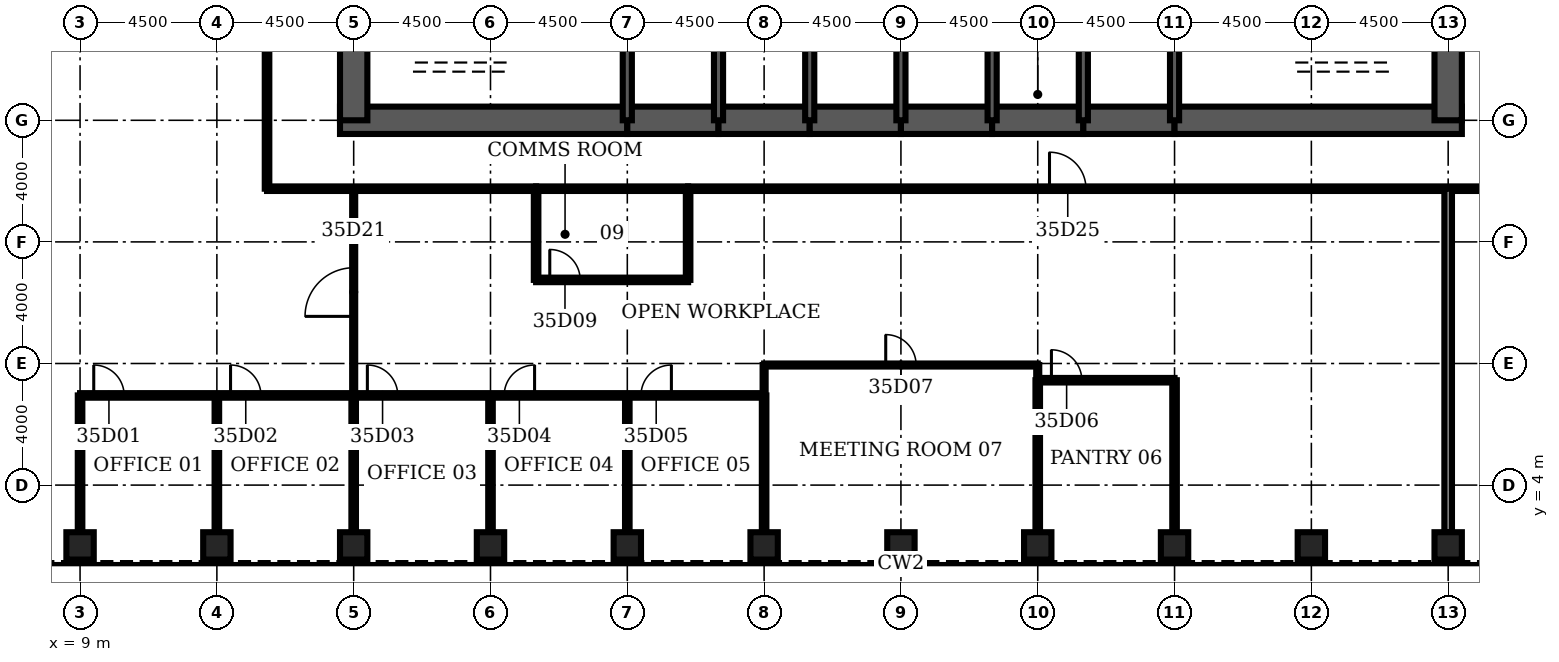
"""IFC4 building model, lengths in metres.
Left out: names, types, materials, properties, quantities, classifications, styles, units other than length and angle.
Written with IfcOpenShell. Run it as: python <this file> out.ifc"""

import sys

from ifc_helpers import new_model, si_unit, direction, frame, frame_2d, origin, origin_2d, place, context, subcontext, project, spatial, rectangle, hollow_rectangle, extrude, element, fill, save


model = new_model("IFC4")
c1 = context("Model", 3, precision=1e-05, world=origin(), true_north=direction((0.0, 1.0)))
c2 = subcontext(c1, "Body", "Model", "MODEL_VIEW")
j1 = project(units=[si_unit("LENGTHUNIT", "METRE"), si_unit("PLANEANGLEUNIT", "RADIAN")], contexts=[c1])
p1 = place(None, origin())
s1 = spatial("IfcSite", under=j1, at=p1, CompositionType="ELEMENT")
p2 = place(p1, origin())
s2 = spatial("IfcBuilding", under=s1, at=p2, CompositionType="ELEMENT")
p3 = place(p2, frame((0.0, 0.0, 159.3)))
s3 = spatial("IfcBuildingStorey", under=s2, at=p3, CompositionType="ELEMENT", Elevation=159.3)
for number, where, z_axis, x_axis in (
    (1, (9.0, 2.0, 0.0), (0.0, 0.0, 1.0), (0.0, 1.0, 0.0)),
    (2, (13.5, 2.0, 0.0), (0.0, 0.0, 1.0), (0.0, 1.0, 0.0)),
    (3, (18.0, 2.0, 0.0), (0.0, 0.0, 1.0), (0.0, 1.0, 0.0)),
    (4, (22.5, 2.0, 0.0), (0.0, 0.0, 1.0), (0.0, 1.0, 0.0)),
    (5, (27.0, 2.0, 0.0), (0.0, 0.0, 1.0), (0.0, 1.0, 0.0)),
    (6, (31.5, 2.0, 0.0), (0.0, 0.0, 1.0), (0.0, 1.0, 0.0)),
    (7, (36.0, 2.0, 0.0), (0.0, 0.0, 1.0), (0.0, 1.0, 0.0)),
    (8, (40.5, 2.0, 0.0), (0.0, 0.0, 1.0), (0.0, 1.0, 0.0)),
    (9, (45.0, 2.0, 0.0), (0.0, 0.0, 1.0), (0.0, 1.0, 0.0)),
    (10, (49.5, 2.0, 0.0), (0.0, 0.0, 1.0), (0.0, 1.0, 0.0)),
    (11, (54.0, 2.0, 0.0), (0.0, 0.0, 1.0), (0.0, 1.0, 0.0)),
):
    element("IfcColumn", number, at=place(p3, frame(where, z_axis=z_axis, x_axis=x_axis)), inside=s3, PredefinedType="COLUMN", context=c2, shape_type="SweptSolid", body=[
        extrude(hollow_rectangle(XDim=0.9, YDim=0.9, WallThickness=0.1, at=origin_2d()), origin(), (0.0, 0.0, 1.0), 4.2),
    ])
p4 = place(p3, frame((17.55, 16.0, 0.0), z_axis=(0.0, 0.0, 1.0), x_axis=(1.0, 0.0, 0.0)))
e12 = element("IfcWall", 12, at=p4, inside=s3, PredefinedType="SHEAR", context=c2, shape_type="SweptSolid", body=[
    extrude(rectangle(XDim=9.45, YDim=0.9, at=frame_2d((4.725, 0.0))), origin(), (0.0, 0.0, 1.0), 4.2),
])
for number, where, z_axis, x_axis in (
    (13, (27.0, 16.0, 0.0), (0.0, 0.0, 1.0), (1.0, 0.0, 0.0)),
    (14, (30.0, 16.0, 0.0), (0.0, 0.0, 1.0), (1.0, 0.0, 0.0)),
    (15, (33.0, 16.0, 0.0), (0.0, 0.0, 1.0), (1.0, 0.0, 0.0)),
    (16, (36.0, 16.0, 0.0), (0.0, 0.0, 1.0), (1.0, 0.0, 0.0)),
    (17, (39.0, 16.0, 0.0), (0.0, 0.0, 1.0), (1.0, 0.0, 0.0)),
    (18, (42.0, 16.0, 0.0), (0.0, 0.0, 1.0), (1.0, 0.0, 0.0)),
):
    element("IfcWall", number, at=place(p3, frame(where, z_axis=z_axis, x_axis=x_axis)), inside=s3, PredefinedType="SHEAR", context=c2, shape_type="SweptSolid", body=[
        extrude(rectangle(XDim=3.0, YDim=0.9, at=frame_2d((1.5, 0.0))), origin(), (0.0, 0.0, 1.0), 4.2),
    ])
p5 = place(p3, frame((45.0, 16.0, 0.0), z_axis=(0.0, 0.0, 1.0), x_axis=(1.0, 0.0, 0.0)))
e19 = element("IfcWall", 19, at=p5, inside=s3, PredefinedType="SHEAR", context=c2, shape_type="SweptSolid", body=[
    extrude(rectangle(XDim=9.45, YDim=0.9, at=frame_2d((4.725, 0.0))), origin(), (0.0, 0.0, 1.0), 4.2),
])
for number, where, z_axis, x_axis in (
    (20, (18.0, 19.2, 0.0), (0.0, 0.0, 1.0), (0.0, -1.0, 0.0)),
    (21, (54.0, 16.0, 0.0), (0.0, 0.0, 1.0), (0.0, 1.0, 0.0)),
):
    element("IfcWall", number, at=place(p3, frame(where, z_axis=z_axis, x_axis=x_axis)), inside=s3, PredefinedType="SHEAR", context=c2, shape_type="SweptSolid", body=[
        extrude(rectangle(XDim=3.2, YDim=0.9, at=frame_2d((1.6, 0.0))), origin(), (0.0, 0.0, 1.0), 4.2),
    ])
for number, where, z_axis, x_axis in (
    (22, (27.0, 16.0, 0.0), (0.0, 0.0, 1.0), (0.0, 1.0, 0.0)),
    (23, (30.0, 16.0, 0.0), (0.0, 0.0, 1.0), (0.0, 1.0, 0.0)),
    (24, (33.0, 16.0, 0.0), (0.0, 0.0, 1.0), (0.0, 1.0, 0.0)),
    (25, (36.0, 16.0, 0.0), (0.0, 0.0, 1.0), (0.0, 1.0, 0.0)),
    (26, (39.0, 16.0, 0.0), (0.0, 0.0, 1.0), (0.0, 1.0, 0.0)),
    (27, (42.0, 16.0, 0.0), (0.0, 0.0, 1.0), (0.0, 1.0, 0.0)),
    (28, (45.0, 16.0, 0.0), (0.0, 0.0, 1.0), (0.0, 1.0, 0.0)),
):
    element("IfcWall", number, at=place(p3, frame(where, z_axis=z_axis, x_axis=x_axis)), inside=s3, PredefinedType="SOLIDWALL", context=c2, shape_type="SweptSolid", body=[
        extrude(rectangle(XDim=3.2, YDim=0.3, at=frame_2d((1.6, 0.0))), origin(), (0.0, 0.0, 1.0), 4.2),
    ])
p6 = place(p3, frame((39.15, 17.4, 0.0), z_axis=(0.0, 0.0, 1.0), x_axis=(1.0, 0.0, 0.0)))
e29 = element("IfcWall", 29, at=p6, inside=s3, PredefinedType="SOLIDWALL", context=c2, shape_type="SweptSolid", body=[
    extrude(rectangle(XDim=2.7, YDim=0.3, at=frame_2d((1.35, 0.0))), origin(), (0.0, 0.0, 1.0), 4.04),
])
p7 = place(p6, frame((0.85, 0.0, 0.0)))
e30 = element("IfcOpeningElement", 30, at=p7, cuts=e29, PredefinedType="OPENING", context=c2, shape_type="SweptSolid", body=[
    extrude(rectangle(XDim=1.0, YDim=2.1, at=frame_2d((0.5, 1.05))), frame((0.0, 0.16, 0.0), z_axis=(0.0, -1.0, 0.0), x_axis=(1.0, 0.0, 0.0)), (0.0, 0.0, 1.0), 0.32),
])
p8 = place(p3, frame((9.0, 6.95, 0.0), z_axis=(0.0, 0.0, 1.0), x_axis=(1.0, 0.0, 0.0)))
e31 = element("IfcWall", 31, at=p8, inside=s3, PredefinedType="PARTITIONING", context=c2, shape_type="SweptSolid", body=[
    extrude(rectangle(XDim=22.5, YDim=0.15, at=frame_2d((11.25, 0.0))), origin(), (0.0, 0.0, 1.0), 3.0),
])
p9 = place(p8, frame((0.45, 0.0, 0.0)))
e32 = element("IfcOpeningElement", 32, at=p9, cuts=e31, PredefinedType="OPENING", context=c2, shape_type="SweptSolid", body=[
    extrude(rectangle(XDim=1.0, YDim=2.1, at=frame_2d((0.5, 1.05))), frame((0.0, 0.085, 0.0), z_axis=(0.0, -1.0, 0.0), x_axis=(1.0, 0.0, 0.0)), (0.0, 0.0, 1.0), 0.17),
])
p10 = place(p8, frame((4.95, 0.0, 0.0)))
e33 = element("IfcOpeningElement", 33, at=p10, cuts=e31, PredefinedType="OPENING", context=c2, shape_type="SweptSolid", body=[
    extrude(rectangle(XDim=1.0, YDim=2.1, at=frame_2d((0.5, 1.05))), frame((0.0, 0.085, 0.0), z_axis=(0.0, -1.0, 0.0), x_axis=(1.0, 0.0, 0.0)), (0.0, 0.0, 1.0), 0.17),
])
p11 = place(p8, frame((9.45, 0.0, 0.0)))
e34 = element("IfcOpeningElement", 34, at=p11, cuts=e31, PredefinedType="OPENING", context=c2, shape_type="SweptSolid", body=[
    extrude(rectangle(XDim=1.0, YDim=2.1, at=frame_2d((0.5, 1.05))), frame((0.0, 0.085, 0.0), z_axis=(0.0, -1.0, 0.0), x_axis=(1.0, 0.0, 0.0)), (0.0, 0.0, 1.0), 0.17),
])
p12 = place(p8, frame((13.95, 0.0, 0.0)))
e35 = element("IfcOpeningElement", 35, at=p12, cuts=e31, PredefinedType="OPENING", context=c2, shape_type="SweptSolid", body=[
    extrude(rectangle(XDim=1.0, YDim=2.1, at=frame_2d((0.5, 1.05))), frame((0.0, 0.085, 0.0), z_axis=(0.0, -1.0, 0.0), x_axis=(1.0, 0.0, 0.0)), (0.0, 0.0, 1.0), 0.17),
])
p13 = place(p8, frame((18.45, 0.0, 0.0)))
e36 = element("IfcOpeningElement", 36, at=p13, cuts=e31, PredefinedType="OPENING", context=c2, shape_type="SweptSolid", body=[
    extrude(rectangle(XDim=1.0, YDim=2.1, at=frame_2d((0.5, 1.05))), frame((0.0, 0.085, 0.0), z_axis=(0.0, -1.0, 0.0), x_axis=(1.0, 0.0, 0.0)), (0.0, 0.0, 1.0), 0.17),
])
p14 = place(p3, frame((40.5, 7.45, 0.0), z_axis=(0.0, 0.0, 1.0), x_axis=(1.0, 0.0, 0.0)))
e37 = element("IfcWall", 37, at=p14, inside=s3, PredefinedType="PARTITIONING", context=c2, shape_type="SweptSolid", body=[
    extrude(rectangle(XDim=4.5, YDim=0.15, at=frame_2d((2.25, 0.0))), origin(), (0.0, 0.0, 1.0), 3.0),
])
p15 = place(p14, frame((0.45, 0.0, 0.0)))
e38 = element("IfcOpeningElement", 38, at=p15, cuts=e37, PredefinedType="OPENING", context=c2, shape_type="SweptSolid", body=[
    extrude(rectangle(XDim=1.0, YDim=2.1, at=frame_2d((0.5, 1.05))), frame((0.0, 0.085, 0.0), z_axis=(0.0, -1.0, 0.0), x_axis=(1.0, 0.0, 0.0)), (0.0, 0.0, 1.0), 0.17),
])
p16 = place(p3, frame((31.5, 7.95, 0.0), z_axis=(0.0, 0.0, 1.0), x_axis=(1.0, 0.0, 0.0)))
e39 = element("IfcWall", 39, at=p16, inside=s3, PredefinedType="PARTITIONING", context=c2, shape_type="SweptSolid", body=[
    extrude(rectangle(XDim=9.0, YDim=0.1, at=frame_2d((4.5, 0.0))), origin(), (0.0, 0.0, 1.0), 3.0),
])
p17 = place(p16, frame((4.0, 0.0, 0.0)))
e40 = element("IfcOpeningElement", 40, at=p17, cuts=e39, PredefinedType="OPENING", context=c2, shape_type="SweptSolid", body=[
    extrude(rectangle(XDim=1.0, YDim=2.1, at=frame_2d((0.5, 1.05))), frame((0.0, 0.06, 0.0), z_axis=(0.0, -1.0, 0.0), x_axis=(1.0, 0.0, 0.0)), (0.0, 0.0, 1.0), 0.12),
])
p18 = place(p3, frame((24.0, 10.75, 0.0), z_axis=(0.0, 0.0, 1.0), x_axis=(1.0, 0.0, 0.0)))
e41 = element("IfcWall", 41, at=p18, inside=s3, PredefinedType="PARTITIONING", context=c2, shape_type="SweptSolid", body=[
    extrude(rectangle(XDim=5.0, YDim=0.15, at=frame_2d((2.5, 0.0))), origin(), (0.0, 0.0, 1.0), 3.0),
])
p19 = place(p18, frame((0.45, 0.0, 0.0)))
e42 = element("IfcOpeningElement", 42, at=p19, cuts=e41, PredefinedType="OPENING", context=c2, shape_type="SweptSolid", body=[
    extrude(rectangle(XDim=1.0, YDim=2.1, at=frame_2d((0.5, 1.05))), frame((0.0, 0.085, 0.0), z_axis=(0.0, -1.0, 0.0), x_axis=(1.0, 0.0, 0.0)), (0.0, 0.0, 1.0), 0.17),
])
p20 = place(p3, frame((15.15, 13.75, 0.0), z_axis=(0.0, 0.0, 1.0), x_axis=(1.0, 0.0, 0.0)))
e43 = element("IfcWall", 43, at=p20, inside=s3, PredefinedType="PARTITIONING", context=c2, shape_type="SweptSolid", body=[
    extrude(rectangle(XDim=8.85, YDim=0.15, at=frame_2d((4.425, 0.0))), origin(), (0.0, 0.0, 1.0), 3.0),
])
p21 = place(p3, frame((24.0, 13.75, 0.0), z_axis=(0.0, 0.0, 1.0), x_axis=(1.0, 0.0, 0.0)))
e44 = element("IfcWall", 44, at=p21, inside=s3, PredefinedType="PARTITIONING", context=c2, shape_type="SweptSolid", body=[
    extrude(rectangle(XDim=5.0, YDim=0.15, at=frame_2d((2.5, 0.0))), origin(), (0.0, 0.0, 1.0), 3.0),
])
p22 = place(p3, frame((29.0, 13.75, 0.0), z_axis=(0.0, 0.0, 1.0), x_axis=(1.0, 0.0, 0.0)))
e45 = element("IfcWall", 45, at=p22, inside=s3, PredefinedType="PARTITIONING", context=c2, shape_type="SweptSolid", body=[
    extrude(rectangle(XDim=27.85, YDim=0.15, at=frame_2d((13.925, 0.0))), origin(), (0.0, 0.0, 1.0), 3.0),
])
p23 = place(p22, frame((11.887, 0.0, 0.0)))
e46 = element("IfcOpeningElement", 46, at=p23, cuts=e45, PredefinedType="OPENING", context=c2, shape_type="SweptSolid", body=[
    extrude(rectangle(XDim=1.2, YDim=2.1, at=frame_2d((0.6, 1.05))), frame((0.0, 0.085, 0.0), z_axis=(0.0, -1.0, 0.0), x_axis=(1.0, 0.0, 0.0)), (0.0, 0.0, 1.0), 0.17),
])
for number, where, z_axis, x_axis in (
    (47, (9.0, 2.45, 0.0), (0.0, 0.0, 1.0), (0.0, 1.0, 0.0)),
    (48, (13.5, 2.45, 0.0), (0.0, 0.0, 1.0), (0.0, 1.0, 0.0)),
):
    element("IfcWall", number, at=place(p3, frame(where, z_axis=z_axis, x_axis=x_axis)), inside=s3, PredefinedType="PARTITIONING", context=c2, shape_type="SweptSolid", body=[
        extrude(rectangle(XDim=4.5, YDim=0.15, at=frame_2d((2.25, 0.0))), origin(), (0.0, 0.0, 1.0), 3.0),
    ])
p24 = place(p3, frame((15.15, 13.75, 0.0), z_axis=(0.0, 0.0, 1.0), x_axis=(0.0, 1.0, 0.0)))
e49 = element("IfcWall", 49, at=p24, inside=s3, PredefinedType="PARTITIONING", context=c2, shape_type="SweptSolid", body=[
    extrude(rectangle(XDim=20.5, YDim=0.15, at=frame_2d((10.25, 0.0))), origin(), (0.0, 0.0, 1.0), 3.0),
])
p25 = place(p24, frame((9.65, 0.0, 0.0)))
e50 = element("IfcOpeningElement", 50, at=p25, cuts=e49, PredefinedType="OPENING", context=c2, shape_type="SweptSolid", body=[
    extrude(rectangle(XDim=1.2, YDim=2.1, at=frame_2d((0.6, 1.05))), frame((0.0, 0.085, 0.0), z_axis=(0.0, -1.0, 0.0), x_axis=(1.0, 0.0, 0.0)), (0.0, 0.0, 1.0), 0.17),
])
p26 = place(p3, frame((18.0, 2.45, 0.0), z_axis=(0.0, 0.0, 1.0), x_axis=(0.0, 1.0, 0.0)))
e51 = element("IfcWall", 51, at=p26, inside=s3, PredefinedType="PARTITIONING", context=c2, shape_type="SweptSolid", body=[
    extrude(rectangle(XDim=4.5, YDim=0.15, at=frame_2d((2.25, 0.0))), origin(), (0.0, 0.0, 1.0), 3.0),
])
p27 = place(p3, frame((18.0, 6.95, 0.0), z_axis=(0.0, 0.0, 1.0), x_axis=(0.0, 1.0, 0.0)))
e52 = element("IfcWall", 52, at=p27, inside=s3, PredefinedType="PARTITIONING", context=c2, shape_type="SweptSolid", body=[
    extrude(rectangle(XDim=6.8, YDim=0.1, at=frame_2d((3.4, 0.0))), origin(), (0.0, 0.0, 1.0), 3.0),
])
p28 = place(p27, frame((2.6, 0.0, 0.0)))
e53 = element("IfcOpeningElement", 53, at=p28, cuts=e52, PredefinedType="OPENING", context=c2, shape_type="SweptSolid", body=[
    extrude(rectangle(XDim=1.6, YDim=2.1, at=frame_2d((0.8, 1.05))), frame((0.0, 0.06, 0.0), z_axis=(0.0, -1.0, 0.0), x_axis=(1.0, 0.0, 0.0)), (0.0, 0.0, 1.0), 0.12),
])
p29 = place(p3, frame((22.5, 2.45, 0.0), z_axis=(0.0, 0.0, 1.0), x_axis=(0.0, 1.0, 0.0)))
e54 = element("IfcWall", 54, at=p29, inside=s3, PredefinedType="PARTITIONING", context=c2, shape_type="SweptSolid", body=[
    extrude(rectangle(XDim=4.5, YDim=0.15, at=frame_2d((2.25, 0.0))), origin(), (0.0, 0.0, 1.0), 3.0),
])
p30 = place(p3, frame((24.0, 10.75, 0.0), z_axis=(0.0, 0.0, 1.0), x_axis=(0.0, 1.0, 0.0)))
e55 = element("IfcWall", 55, at=p30, inside=s3, PredefinedType="PARTITIONING", context=c2, shape_type="SweptSolid", body=[
    extrude(rectangle(XDim=3.0, YDim=0.15, at=frame_2d((1.5, 0.0))), origin(), (0.0, 0.0, 1.0), 3.0),
])
p31 = place(p3, frame((27.0, 2.45, 0.0), z_axis=(0.0, 0.0, 1.0), x_axis=(0.0, 1.0, 0.0)))
e56 = element("IfcWall", 56, at=p31, inside=s3, PredefinedType="PARTITIONING", context=c2, shape_type="SweptSolid", body=[
    extrude(rectangle(XDim=4.5, YDim=0.15, at=frame_2d((2.25, 0.0))), origin(), (0.0, 0.0, 1.0), 3.0),
])
p32 = place(p3, frame((29.0, 10.75, 0.0), z_axis=(0.0, 0.0, 1.0), x_axis=(0.0, 1.0, 0.0)))
e57 = element("IfcWall", 57, at=p32, inside=s3, PredefinedType="PARTITIONING", context=c2, shape_type="SweptSolid", body=[
    extrude(rectangle(XDim=3.0, YDim=0.15, at=frame_2d((1.5, 0.0))), origin(), (0.0, 0.0, 1.0), 3.0),
])
p33 = place(p3, frame((31.5, 2.45, 0.0), z_axis=(0.0, 0.0, 1.0), x_axis=(0.0, 1.0, 0.0)))
e58 = element("IfcWall", 58, at=p33, inside=s3, PredefinedType="PARTITIONING", context=c2, shape_type="SweptSolid", body=[
    extrude(rectangle(XDim=4.5, YDim=0.15, at=frame_2d((2.25, 0.0))), origin(), (0.0, 0.0, 1.0), 3.0),
])
p34 = place(p3, frame((31.5, 6.95, 0.0), z_axis=(0.0, 0.0, 1.0), x_axis=(0.0, 1.0, 0.0)))
e59 = element("IfcWall", 59, at=p34, inside=s3, PredefinedType="PARTITIONING", context=c2, shape_type="SweptSolid", body=[
    extrude(rectangle(XDim=1.0, YDim=0.1, at=frame_2d((0.5, 0.0))), origin(), (0.0, 0.0, 1.0), 3.0),
])
p35 = place(p3, frame((40.5, 2.45, 0.0), z_axis=(0.0, 0.0, 1.0), x_axis=(0.0, 1.0, 0.0)))
e60 = element("IfcWall", 60, at=p35, inside=s3, PredefinedType="PARTITIONING", context=c2, shape_type="SweptSolid", body=[
    extrude(rectangle(XDim=5.0, YDim=0.15, at=frame_2d((2.5, 0.0))), origin(), (0.0, 0.0, 1.0), 3.0),
])
p36 = place(p3, frame((40.5, 7.45, 0.0), z_axis=(0.0, 0.0, 1.0), x_axis=(0.0, 1.0, 0.0)))
e61 = element("IfcWall", 61, at=p36, inside=s3, PredefinedType="PARTITIONING", context=c2, shape_type="SweptSolid", body=[
    extrude(rectangle(XDim=0.5, YDim=0.1, at=frame_2d((0.25, 0.0))), origin(), (0.0, 0.0, 1.0), 3.0),
])
p37 = place(p3, frame((45.0, 2.45, 0.0), z_axis=(0.0, 0.0, 1.0), x_axis=(0.0, 1.0, 0.0)))
e62 = element("IfcWall", 62, at=p37, inside=s3, PredefinedType="PARTITIONING", context=c2, shape_type="SweptSolid", body=[
    extrude(rectangle(XDim=5.0, YDim=0.15, at=frame_2d((2.5, 0.0))), origin(), (0.0, 0.0, 1.0), 3.0),
])
p38 = place(p3, frame((54.0, 2.45, 0.0), z_axis=(0.0, 0.0, 1.0), x_axis=(0.0, 1.0, 0.0)))
e63 = element("IfcWall", 63, at=p38, inside=s3, PredefinedType="PARTITIONING", context=c2, shape_type="SweptSolid", body=[
    extrude(rectangle(XDim=11.3, YDim=0.25, at=frame_2d((5.65, 0.0))), origin(), (0.0, 0.0, 1.0), 3.0),
])
p39 = place(p7, origin())
e64 = element("IfcDoor", 64, at=p39, inside=s3, OperationType="SINGLE_SWING_LEFT", PredefinedType="DOOR", context=c2, shape_type="SweptSolid", body=[
    extrude(rectangle(XDim=1.0, YDim=2.1, at=frame_2d((0.5, 1.05))), frame((0.0, 0.025, 0.0), z_axis=(0.0, -1.0, 0.0), x_axis=(1.0, 0.0, 0.0)), (0.0, 0.0, 1.0), 0.05),
])
fill(e30, e64)
p40 = place(p9, origin())
e65 = element("IfcDoor", 65, at=p40, inside=s3, OperationType="SINGLE_SWING_LEFT", PredefinedType="DOOR", context=c2, shape_type="SweptSolid", body=[
    extrude(rectangle(XDim=1.0, YDim=2.1, at=frame_2d((0.5, 1.05))), frame((0.0, 0.025, 0.0), z_axis=(0.0, -1.0, 0.0), x_axis=(1.0, 0.0, 0.0)), (0.0, 0.0, 1.0), 0.05),
])
fill(e32, e65)
p41 = place(p10, origin())
e66 = element("IfcDoor", 66, at=p41, inside=s3, OperationType="SINGLE_SWING_LEFT", PredefinedType="DOOR", context=c2, shape_type="SweptSolid", body=[
    extrude(rectangle(XDim=1.0, YDim=2.1, at=frame_2d((0.5, 1.05))), frame((0.0, 0.025, 0.0), z_axis=(0.0, -1.0, 0.0), x_axis=(1.0, 0.0, 0.0)), (0.0, 0.0, 1.0), 0.05),
])
fill(e33, e66)
p42 = place(p11, origin())
e67 = element("IfcDoor", 67, at=p42, inside=s3, OperationType="SINGLE_SWING_LEFT", PredefinedType="DOOR", context=c2, shape_type="SweptSolid", body=[
    extrude(rectangle(XDim=1.0, YDim=2.1, at=frame_2d((0.5, 1.05))), frame((0.0, 0.025, 0.0), z_axis=(0.0, -1.0, 0.0), x_axis=(1.0, 0.0, 0.0)), (0.0, 0.0, 1.0), 0.05),
])
fill(e34, e67)
p43 = place(p12, origin())
e68 = element("IfcDoor", 68, at=p43, inside=s3, OperationType="SINGLE_SWING_RIGHT", PredefinedType="DOOR", context=c2, shape_type="SweptSolid", body=[
    extrude(rectangle(XDim=1.0, YDim=2.1, at=frame_2d((0.5, 1.05))), frame((0.0, 0.025, 0.0), z_axis=(0.0, -1.0, 0.0), x_axis=(1.0, 0.0, 0.0)), (0.0, 0.0, 1.0), 0.05),
])
fill(e35, e68)
p44 = place(p13, origin())
e69 = element("IfcDoor", 69, at=p44, inside=s3, OperationType="SINGLE_SWING_RIGHT", PredefinedType="DOOR", context=c2, shape_type="SweptSolid", body=[
    extrude(rectangle(XDim=1.0, YDim=2.1, at=frame_2d((0.5, 1.05))), frame((0.0, 0.025, 0.0), z_axis=(0.0, -1.0, 0.0), x_axis=(1.0, 0.0, 0.0)), (0.0, 0.0, 1.0), 0.05),
])
fill(e36, e69)
p45 = place(p15, origin())
e70 = element("IfcDoor", 70, at=p45, inside=s3, OperationType="SINGLE_SWING_LEFT", PredefinedType="DOOR", context=c2, shape_type="SweptSolid", body=[
    extrude(rectangle(XDim=1.0, YDim=2.1, at=frame_2d((0.5, 1.05))), frame((0.0, 0.025, 0.0), z_axis=(0.0, -1.0, 0.0), x_axis=(1.0, 0.0, 0.0)), (0.0, 0.0, 1.0), 0.05),
])
fill(e38, e70)
p46 = place(p17, origin())
e71 = element("IfcDoor", 71, at=p46, inside=s3, OperationType="SINGLE_SWING_LEFT", PredefinedType="DOOR", context=c2, shape_type="SweptSolid", body=[
    extrude(rectangle(XDim=1.0, YDim=2.1, at=frame_2d((0.5, 1.05))), frame((0.0, 0.025, 0.0), z_axis=(0.0, -1.0, 0.0), x_axis=(1.0, 0.0, 0.0)), (0.0, 0.0, 1.0), 0.05),
])
fill(e40, e71)
p47 = place(p19, origin())
e72 = element("IfcDoor", 72, at=p47, inside=s3, OperationType="SINGLE_SWING_LEFT", PredefinedType="DOOR", context=c2, shape_type="SweptSolid", body=[
    extrude(rectangle(XDim=1.0, YDim=2.1, at=frame_2d((0.5, 1.05))), frame((0.0, 0.025, 0.0), z_axis=(0.0, -1.0, 0.0), x_axis=(1.0, 0.0, 0.0)), (0.0, 0.0, 1.0), 0.05),
])
fill(e42, e72)
p48 = place(p28, origin())
e73 = element("IfcDoor", 73, at=p48, inside=s3, OperationType="SINGLE_SWING_LEFT", PredefinedType="DOOR", context=c2, shape_type="SweptSolid", body=[
    extrude(rectangle(XDim=1.6, YDim=2.1, at=frame_2d((0.8, 1.05))), frame((0.0, 0.025, 0.0), z_axis=(0.0, -1.0, 0.0), x_axis=(1.0, 0.0, 0.0)), (0.0, 0.0, 1.0), 0.05),
])
fill(e53, e73)
p49 = place(p23, origin())
e74 = element("IfcDoor", 74, at=p49, inside=s3, OperationType="SINGLE_SWING_LEFT", PredefinedType="DOOR", context=c2, shape_type="SweptSolid", body=[
    extrude(rectangle(XDim=1.2, YDim=2.1, at=frame_2d((0.6, 1.05))), frame((0.0, 0.025, 0.0), z_axis=(0.0, -1.0, 0.0), x_axis=(1.0, 0.0, 0.0)), (0.0, 0.0, 1.0), 0.05),
])
fill(e46, e74)
save(model, sys.argv[1])
